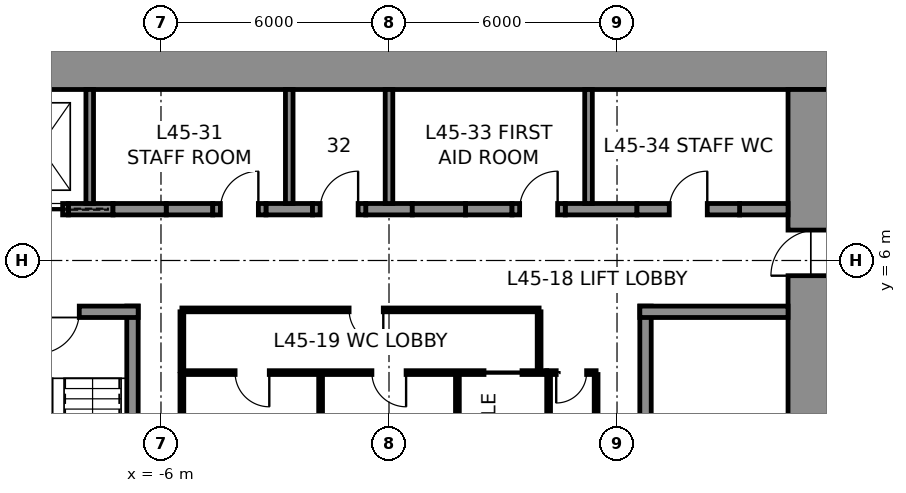
"""IFC4 building model, lengths in metres.
Left out: names, types, materials, properties, quantities, classifications, styles, units other than length and angle.
Written with IfcOpenShell. Run it as: python <this file> out.ifc"""

import sys

from ifc_helpers import new_model, si_unit, direction, frame, frame_2d, origin, place, context, subcontext, project, spatial, rectangle, extrude, element, fill, save


model = new_model("IFC4")
c1 = context("Model", 3, precision=1e-05, world=origin(), true_north=direction((0.0, 1.0)))
c2 = subcontext(c1, "Body", "Model", "MODEL_VIEW")
j1 = project(units=[si_unit("LENGTHUNIT", "METRE"), si_unit("PLANEANGLEUNIT", "RADIAN")], contexts=[c1])
p1 = place(None, origin())
s1 = spatial("IfcSite", under=j1, at=p1, CompositionType="ELEMENT")
p2 = place(p1, origin())
s2 = spatial("IfcBuilding", under=s1, at=p2, CompositionType="ELEMENT")
p3 = place(p2, frame((0.0, 0.0, 209.8)))
s3 = spatial("IfcBuildingStorey", under=s2, at=p3, CompositionType="ELEMENT", Elevation=209.8)
p4 = place(p3, frame((-12.0, 11.25, 0.0), z_axis=(0.0, 0.0, 1.0), x_axis=(1.0, 0.0, 0.0)))
e1 = element("IfcWall", 1, at=p4, inside=s3, PredefinedType="SHEAR", context=c2, shape_type="SweptSolid", body=[
    extrude(rectangle(XDim=24.0, YDim=1.5, at=frame_2d((12.0, 0.0))), origin(), (0.0, 0.0, 1.0), 4.0),
])
p5 = place(p3, frame((11.25, 10.5, 0.0), z_axis=(0.0, 0.0, 1.0), x_axis=(0.0, -1.0, 0.0)))
e2 = element("IfcWall", 2, at=p5, inside=s3, PredefinedType="SHEAR", context=c2, shape_type="SweptSolid", body=[
    extrude(rectangle(XDim=21.0, YDim=1.5, at=frame_2d((10.5, 0.0))), origin(), (0.0, 0.0, 1.0), 4.0),
])
p6 = place(p5, frame((3.7, 0.0, 0.0)))
e3 = element("IfcOpeningElement", 3, at=p6, cuts=e2, PredefinedType="OPENING", context=c2, shape_type="SweptSolid", body=[
    extrude(rectangle(XDim=1.2, YDim=2.3, at=frame_2d((0.6, 1.15))), frame((0.0, 0.76, 0.0), z_axis=(0.0, -1.0, 0.0), x_axis=(1.0, 0.0, 0.0)), (0.0, 0.0, 1.0), 1.52),
])
p7 = place(p5, frame((16.1, 0.0, 0.0)))
e4 = element("IfcOpeningElement", 4, at=p7, cuts=e2, PredefinedType="OPENING", context=c2, shape_type="SweptSolid", body=[
    extrude(rectangle(XDim=1.2, YDim=2.3, at=frame_2d((0.6, 1.15))), frame((0.0, 0.76, 0.0), z_axis=(0.0, -1.0, 0.0), x_axis=(1.0, 0.0, 0.0)), (0.0, 0.0, 1.0), 1.52),
])
p8 = place(p3, frame((-8.438, 7.35, 0.0), z_axis=(0.0, 0.0, 1.0), x_axis=(1.0, 0.0, 0.0)))
e5 = element("IfcWall", 5, at=p8, inside=s3, PredefinedType="SHEAR", context=c2, shape_type="SweptSolid", body=[
    extrude(rectangle(XDim=1.175, YDim=0.3, at=frame_2d((0.587, 0.0))), origin(), (0.0, 0.0, 1.0), 4.0),
])
for number, where, z_axis, x_axis in (
    (6, (-5.863, 7.35, 0.0), (0.0, 0.0, 1.0), (1.0, 0.0, 0.0)),
    (7, (-3.238, 7.35, 0.0), (0.0, 0.0, 1.0), (1.0, 0.0, 0.0)),
    (8, (-0.613, 7.35, 0.0), (0.0, 0.0, 1.0), (1.0, 0.0, 0.0)),
    (9, (2.012, 7.35, 0.0), (0.0, 0.0, 1.0), (1.0, 0.0, 0.0)),
):
    element("IfcWall", number, at=place(p3, frame(where, z_axis=z_axis, x_axis=x_axis)), inside=s3, PredefinedType="SHEAR", context=c2, shape_type="SweptSolid", body=[
        extrude(rectangle(XDim=1.225, YDim=0.3, at=frame_2d((0.613, 0.0))), origin(), (0.0, 0.0, 1.0), 4.0),
    ])
p9 = place(p3, frame((4.637, 7.35, 0.0), z_axis=(0.0, 0.0, 1.0), x_axis=(1.0, 0.0, 0.0)))
e10 = element("IfcWall", 10, at=p9, inside=s3, PredefinedType="SHEAR", context=c2, shape_type="SweptSolid", body=[
    extrude(rectangle(XDim=1.887, YDim=0.3, at=frame_2d((0.944, 0.0))), origin(), (0.0, 0.0, 1.0), 4.0),
])
p10 = place(p3, frame((9.225, 7.35, 0.0), z_axis=(0.0, 0.0, 1.0), x_axis=(1.0, 0.0, 0.0)))
e11 = element("IfcWall", 11, at=p10, inside=s3, PredefinedType="SHEAR", context=c2, shape_type="SweptSolid", body=[
    extrude(rectangle(XDim=1.275, YDim=0.3, at=frame_2d((0.637, 0.0))), origin(), (0.0, 0.0, 1.0), 4.0),
])
p11 = place(p3, frame((-9.938, 7.35, 0.0), z_axis=(0.0, 0.0, 1.0), x_axis=(1.0, 0.0, 0.0)))
e12 = element("IfcWall", 12, at=p11, inside=s3, PredefinedType="PARTITIONING", context=c2, shape_type="SweptSolid", body=[
    extrude(rectangle(XDim=1.5, YDim=0.3, at=frame_2d((0.75, 0.0))), origin(), (0.0, 0.0, 1.0), 4.0),
])
p12 = place(p11, frame((0.15, 0.0, 0.0)))
e13 = element("IfcOpeningElement", 13, at=p12, cuts=e12, PredefinedType="OPENING", context=c2, shape_type="SweptSolid", body=[
    extrude(rectangle(XDim=1.2, YDim=2.3, at=frame_2d((0.6, 1.15))), frame((0.0, 0.16, 0.0), z_axis=(0.0, -1.0, 0.0), x_axis=(1.0, 0.0, 0.0)), (0.0, 0.0, 1.0), 0.32),
])
p13 = place(p3, frame((-7.262, 7.35, 0.0), z_axis=(0.0, 0.0, 1.0), x_axis=(1.0, 0.0, 0.0)))
e14 = element("IfcWall", 14, at=p13, inside=s3, PredefinedType="PARTITIONING", context=c2, shape_type="SweptSolid", body=[
    extrude(rectangle(XDim=1.4, YDim=0.3, at=frame_2d((0.7, 0.0))), origin(), (0.0, 0.0, 1.0), 4.0),
])
p14 = place(p3, frame((-4.637, 7.35, 0.0), z_axis=(0.0, 0.0, 1.0), x_axis=(1.0, 0.0, 0.0)))
e15 = element("IfcWall", 15, at=p14, inside=s3, PredefinedType="PARTITIONING", context=c2, shape_type="SweptSolid", body=[
    extrude(rectangle(XDim=1.4, YDim=0.3, at=frame_2d((0.7, 0.0))), origin(), (0.0, 0.0, 1.0), 4.0),
])
p15 = place(p14, frame((0.2, 0.0, 0.0)))
e16 = element("IfcOpeningElement", 16, at=p15, cuts=e15, PredefinedType="OPENING", context=c2, shape_type="SweptSolid", body=[
    extrude(rectangle(XDim=1.0, YDim=2.3, at=frame_2d((0.5, 1.15))), frame((0.0, 0.16, 0.0), z_axis=(0.0, -1.0, 0.0), x_axis=(1.0, 0.0, 0.0)), (0.0, 0.0, 1.0), 0.32),
])
p16 = place(p3, frame((-2.012, 7.35, 0.0), z_axis=(0.0, 0.0, 1.0), x_axis=(1.0, 0.0, 0.0)))
e17 = element("IfcWall", 17, at=p16, inside=s3, PredefinedType="PARTITIONING", context=c2, shape_type="SweptSolid", body=[
    extrude(rectangle(XDim=1.4, YDim=0.3, at=frame_2d((0.7, 0.0))), origin(), (0.0, 0.0, 1.0), 4.0),
])
p17 = place(p16, frame((0.2, 0.0, 0.0)))
e18 = element("IfcOpeningElement", 18, at=p17, cuts=e17, PredefinedType="OPENING", context=c2, shape_type="SweptSolid", body=[
    extrude(rectangle(XDim=1.0, YDim=2.3, at=frame_2d((0.5, 1.15))), frame((0.0, 0.16, 0.0), z_axis=(0.0, -1.0, 0.0), x_axis=(1.0, 0.0, 0.0)), (0.0, 0.0, 1.0), 0.32),
])
p18 = place(p3, frame((0.613, 7.35, 0.0), z_axis=(0.0, 0.0, 1.0), x_axis=(1.0, 0.0, 0.0)))
e19 = element("IfcWall", 19, at=p18, inside=s3, PredefinedType="PARTITIONING", context=c2, shape_type="SweptSolid", body=[
    extrude(rectangle(XDim=1.4, YDim=0.3, at=frame_2d((0.7, 0.0))), origin(), (0.0, 0.0, 1.0), 4.0),
])
p19 = place(p3, frame((3.238, 7.35, 0.0), z_axis=(0.0, 0.0, 1.0), x_axis=(1.0, 0.0, 0.0)))
e20 = element("IfcWall", 20, at=p19, inside=s3, PredefinedType="PARTITIONING", context=c2, shape_type="SweptSolid", body=[
    extrude(rectangle(XDim=1.4, YDim=0.3, at=frame_2d((0.7, 0.0))), origin(), (0.0, 0.0, 1.0), 4.0),
])
p20 = place(p19, frame((0.2, 0.0, 0.0)))
e21 = element("IfcOpeningElement", 21, at=p20, cuts=e20, PredefinedType="OPENING", context=c2, shape_type="SweptSolid", body=[
    extrude(rectangle(XDim=1.0, YDim=2.3, at=frame_2d((0.5, 1.15))), frame((0.0, 0.16, 0.0), z_axis=(0.0, -1.0, 0.0), x_axis=(1.0, 0.0, 0.0)), (0.0, 0.0, 1.0), 0.32),
])
p21 = place(p3, frame((6.525, 7.35, 0.0), z_axis=(0.0, 0.0, 1.0), x_axis=(1.0, 0.0, 0.0)))
e22 = element("IfcWall", 22, at=p21, inside=s3, PredefinedType="PARTITIONING", context=c2, shape_type="SweptSolid", body=[
    extrude(rectangle(XDim=2.7, YDim=0.3, at=frame_2d((1.35, 0.0))), origin(), (0.0, 0.0, 1.0), 4.0),
])
p22 = place(p21, frame((0.85, 0.0, 0.0)))
e23 = element("IfcOpeningElement", 23, at=p22, cuts=e22, PredefinedType="OPENING", context=c2, shape_type="SweptSolid", body=[
    extrude(rectangle(XDim=1.0, YDim=2.3, at=frame_2d((0.5, 1.15))), frame((0.0, 0.16, 0.0), z_axis=(0.0, -1.0, 0.0), x_axis=(1.0, 0.0, 0.0)), (0.0, 0.0, 1.0), 0.32),
])
for number, where, z_axis, x_axis in (
    (24, (-7.875, 7.5, 0.0), (0.0, 0.0, 1.0), (0.0, 1.0, 0.0)),
    (25, (-2.625, 7.5, 0.0), (0.0, 0.0, 1.0), (0.0, 1.0, 0.0)),
    (26, (0.0, 7.5, 0.0), (0.0, 0.0, 1.0), (0.0, 1.0, 0.0)),
    (27, (5.25, 7.5, 0.0), (0.0, 0.0, 1.0), (0.0, 1.0, 0.0)),
):
    element("IfcWall", number, at=place(p3, frame(where, z_axis=z_axis, x_axis=x_axis)), inside=s3, PredefinedType="PARTITIONING", context=c2, shape_type="SweptSolid", body=[
        extrude(rectangle(XDim=3.0, YDim=0.2, at=frame_2d((1.5, 0.0))), origin(), (0.0, 0.0, 1.0), 4.0),
    ])
p23 = place(p3, frame((-6.75, -4.8, 0.0), z_axis=(0.0, 0.0, 1.0), x_axis=(0.0, 1.0, 0.0)))
e28 = element("IfcWall", 28, at=p23, inside=s3, PredefinedType="SOLIDWALL", context=c2, shape_type="SweptSolid", body=[
    extrude(rectangle(XDim=9.6, YDim=0.3, at=frame_2d((4.8, 0.0))), origin(), (0.0, 0.0, 1.0), 3.75),
])
p24 = place(p3, frame((-10.5, 4.65, 0.0), z_axis=(0.0, 0.0, 1.0), x_axis=(1.0, 0.0, 0.0)))
e29 = element("IfcWall", 29, at=p24, inside=s3, PredefinedType="SOLIDWALL", context=c2, shape_type="SweptSolid", body=[
    extrude(rectangle(XDim=3.9, YDim=0.3, at=frame_2d((1.95, 0.0))), origin(), (0.0, 0.0, 1.0), 3.75),
])
p25 = place(p24, frame((1.25, 0.0, 0.0)))
e30 = element("IfcOpeningElement", 30, at=p25, cuts=e29, PredefinedType="OPENING", context=c2, shape_type="SweptSolid", body=[
    extrude(rectangle(XDim=1.1, YDim=2.3, at=frame_2d((0.55, 1.15))), frame((0.0, 0.16, 0.0), z_axis=(0.0, -1.0, 0.0), x_axis=(1.0, 0.0, 0.0)), (0.0, 0.0, 1.0), 0.32),
])
p26 = place(p3, frame((6.75, -4.8, 0.0), z_axis=(0.0, 0.0, 1.0), x_axis=(0.0, 1.0, 0.0)))
e31 = element("IfcWall", 31, at=p26, inside=s3, PredefinedType="SOLIDWALL", context=c2, shape_type="SweptSolid", body=[
    extrude(rectangle(XDim=9.6, YDim=0.3, at=frame_2d((4.8, 0.0))), origin(), (0.0, 0.0, 1.0), 3.75),
])
p27 = place(p3, frame((6.6, 4.65, 0.0), z_axis=(0.0, 0.0, 1.0), x_axis=(1.0, 0.0, 0.0)))
e32 = element("IfcWall", 32, at=p27, inside=s3, PredefinedType="SOLIDWALL", context=c2, shape_type="SweptSolid", body=[
    extrude(rectangle(XDim=3.9, YDim=0.3, at=frame_2d((1.95, 0.0))), origin(), (0.0, 0.0, 1.0), 3.75),
])
p28 = place(p3, frame((-5.45, 3.05, 0.0), z_axis=(0.0, 0.0, 1.0), x_axis=(1.0, 0.0, 0.0)))
e33 = element("IfcWall", 33, at=p28, inside=s3, PredefinedType="PARTITIONING", context=c2, shape_type="SweptSolid", body=[
    extrude(rectangle(XDim=9.6, YDim=0.1, at=frame_2d((4.8, 0.0))), origin(), (0.0, 0.0, 1.0), 3.75),
])
p29 = place(p28, frame((1.4, 0.0, 0.0)))
e34 = element("IfcOpeningElement", 34, at=p29, cuts=e33, PredefinedType="OPENING", context=c2, shape_type="SweptSolid", body=[
    extrude(rectangle(XDim=0.9, YDim=2.3, at=frame_2d((0.45, 1.15))), frame((0.0, 0.06, 0.0), z_axis=(0.0, -1.0, 0.0), x_axis=(1.0, 0.0, 0.0)), (0.0, 0.0, 1.0), 0.12),
])
p30 = place(p28, frame((5.0, 0.0, 0.0)))
e35 = element("IfcOpeningElement", 35, at=p30, cuts=e33, PredefinedType="OPENING", context=c2, shape_type="SweptSolid", body=[
    extrude(rectangle(XDim=0.9, YDim=2.3, at=frame_2d((0.45, 1.15))), frame((0.0, 0.06, 0.0), z_axis=(0.0, -1.0, 0.0), x_axis=(1.0, 0.0, 0.0)), (0.0, 0.0, 1.0), 0.12),
])
p31 = place(p28, frame((7.95, 0.0, 0.0)))
e36 = element("IfcOpeningElement", 36, at=p31, cuts=e33, PredefinedType="OPENING", context=c2, shape_type="SweptSolid", body=[
    extrude(rectangle(XDim=1.0, YDim=2.3, at=frame_2d((0.5, 1.15))), frame((0.0, 0.06, 0.0), z_axis=(0.0, -1.0, 0.0), x_axis=(1.0, 0.0, 0.0)), (0.0, 0.0, 1.0), 0.12),
])
p32 = place(p3, frame((4.15, 3.05, 0.0), z_axis=(0.0, 0.0, 1.0), x_axis=(1.0, 0.0, 0.0)))
e37 = element("IfcWall", 37, at=p32, inside=s3, PredefinedType="PARTITIONING", context=c2, shape_type="SweptSolid", body=[
    extrude(rectangle(XDim=1.3, YDim=0.1, at=frame_2d((0.65, 0.0))), origin(), (0.0, 0.0, 1.0), 3.75),
])
p33 = place(p32, frame((0.25, 0.0, 0.0)))
e38 = element("IfcOpeningElement", 38, at=p33, cuts=e37, PredefinedType="OPENING", context=c2, shape_type="SweptSolid", body=[
    extrude(rectangle(XDim=0.8, YDim=2.3, at=frame_2d((0.4, 1.15))), frame((0.0, 0.06, 0.0), z_axis=(0.0, -1.0, 0.0), x_axis=(1.0, 0.0, 0.0)), (0.0, 0.0, 1.0), 0.12),
])
for number, where, z_axis, x_axis in (
    (39, (5.45, 3.0, 0.0), (0.0, 0.0, 1.0), (0.0, -1.0, 0.0)),
    (40, (-5.45, -3.0, 0.0), (0.0, 0.0, 1.0), (0.0, 1.0, 0.0)),
    (41, (-1.8, -3.0, 0.0), (0.0, 0.0, 1.0), (0.0, 1.0, 0.0)),
    (42, (1.8, -3.0, 0.0), (0.0, 0.0, 1.0), (0.0, 1.0, 0.0)),
    (43, (4.2, -3.0, 0.0), (0.0, 0.0, 1.0), (0.0, 1.0, 0.0)),
):
    element("IfcWall", number, at=place(p3, frame(where, z_axis=z_axis, x_axis=x_axis)), inside=s3, PredefinedType="PARTITIONING", context=c2, shape_type="SweptSolid", body=[
        extrude(rectangle(XDim=6.0, YDim=0.1, at=frame_2d((3.0, 0.0))), origin(), (0.0, 0.0, 1.0), 3.75),
    ])
p34 = place(p3, frame((-5.45, 4.7, 0.0), z_axis=(0.0, 0.0, 1.0), x_axis=(1.0, 0.0, 0.0)))
e44 = element("IfcWall", 44, at=p34, inside=s3, PredefinedType="PARTITIONING", context=c2, shape_type="SweptSolid", body=[
    extrude(rectangle(XDim=9.4, YDim=0.1, at=frame_2d((4.7, 0.0))), origin(), (0.0, 0.0, 1.0), 3.75),
])
p35 = place(p34, frame((4.4, 0.0, 0.0)))
e45 = element("IfcOpeningElement", 45, at=p35, cuts=e44, PredefinedType="OPENING", context=c2, shape_type="SweptSolid", body=[
    extrude(rectangle(XDim=0.9, YDim=2.3, at=frame_2d((0.45, 1.15))), frame((0.0, 0.06, 0.0), z_axis=(0.0, -1.0, 0.0), x_axis=(1.0, 0.0, 0.0)), (0.0, 0.0, 1.0), 0.12),
])
for number, where, z_axis, x_axis in (
    (46, (-5.45, 3.1, 0.0), (0.0, 0.0, 1.0), (0.0, 1.0, 0.0)),
    (47, (3.95, 3.1, 0.0), (0.0, 0.0, 1.0), (0.0, 1.0, 0.0)),
):
    element("IfcWall", number, at=place(p3, frame(where, z_axis=z_axis, x_axis=x_axis)), inside=s3, PredefinedType="PARTITIONING", context=c2, shape_type="SweptSolid", body=[
        extrude(rectangle(XDim=1.55, YDim=0.1, at=frame_2d((0.775, 0.0))), origin(), (0.0, 0.0, 1.0), 3.75),
    ])
p36 = place(p25, frame((1.1, 0.0, 0.0), z_axis=(0.0, 0.0, 1.0), x_axis=(-1.0, 0.0, 0.0)))
e48 = element("IfcDoor", 48, at=p36, inside=s3, OperationType="SINGLE_SWING_RIGHT", PredefinedType="DOOR", context=c2, shape_type="SweptSolid", body=[
    extrude(rectangle(XDim=1.1, YDim=2.3, at=frame_2d((0.55, 1.15))), frame((0.0, 0.025, 0.0), z_axis=(0.0, -1.0, 0.0), x_axis=(1.0, 0.0, 0.0)), (0.0, 0.0, 1.0), 0.05),
])
fill(e30, e48)
p37 = place(p29, frame((0.9, 0.0, 0.0), z_axis=(0.0, 0.0, 1.0), x_axis=(-1.0, 0.0, 0.0)))
e49 = element("IfcDoor", 49, at=p37, inside=s3, OperationType="SINGLE_SWING_LEFT", PredefinedType="DOOR", context=c2, shape_type="SweptSolid", body=[
    extrude(rectangle(XDim=0.9, YDim=2.3, at=frame_2d((0.45, 1.15))), frame((0.0, 0.025, 0.0), z_axis=(0.0, -1.0, 0.0), x_axis=(1.0, 0.0, 0.0)), (0.0, 0.0, 1.0), 0.05),
])
fill(e34, e49)
p38 = place(p30, frame((0.9, 0.0, 0.0), z_axis=(0.0, 0.0, 1.0), x_axis=(-1.0, 0.0, 0.0)))
e50 = element("IfcDoor", 50, at=p38, inside=s3, OperationType="SINGLE_SWING_LEFT", PredefinedType="DOOR", context=c2, shape_type="SweptSolid", body=[
    extrude(rectangle(XDim=0.9, YDim=2.3, at=frame_2d((0.45, 1.15))), frame((0.0, 0.025, 0.0), z_axis=(0.0, -1.0, 0.0), x_axis=(1.0, 0.0, 0.0)), (0.0, 0.0, 1.0), 0.05),
])
fill(e35, e50)
p39 = place(p31, frame((1.0, 0.0, 0.0), z_axis=(0.0, 0.0, 1.0), x_axis=(-1.0, 0.0, 0.0)))
e51 = element("IfcDoor", 51, at=p39, inside=s3, OperationType="SLIDING_TO_LEFT", PredefinedType="DOOR", context=c2, shape_type="SweptSolid", body=[
    extrude(rectangle(XDim=1.0, YDim=2.3, at=frame_2d((0.5, 1.15))), frame((0.0, 0.025, 0.0), z_axis=(0.0, -1.0, 0.0), x_axis=(1.0, 0.0, 0.0)), (0.0, 0.0, 1.0), 0.05),
])
fill(e36, e51)
p40 = place(p33, frame((0.8, 0.0, 0.0), z_axis=(0.0, 0.0, 1.0), x_axis=(-1.0, 0.0, 0.0)))
e52 = element("IfcDoor", 52, at=p40, inside=s3, OperationType="SINGLE_SWING_RIGHT", PredefinedType="DOOR", context=c2, shape_type="SweptSolid", body=[
    extrude(rectangle(XDim=0.8, YDim=2.3, at=frame_2d((0.4, 1.15))), frame((0.0, 0.025, 0.0), z_axis=(0.0, -1.0, 0.0), x_axis=(1.0, 0.0, 0.0)), (0.0, 0.0, 1.0), 0.05),
])
fill(e38, e52)
p41 = place(p35, frame((0.9, 0.0, 0.0), z_axis=(0.0, 0.0, 1.0), x_axis=(-1.0, 0.0, 0.0)))
e53 = element("IfcDoor", 53, at=p41, inside=s3, OperationType="SINGLE_SWING_LEFT", PredefinedType="DOOR", context=c2, shape_type="SweptSolid", body=[
    extrude(rectangle(XDim=0.9, YDim=2.3, at=frame_2d((0.45, 1.15))), frame((0.0, 0.025, 0.0), z_axis=(0.0, -1.0, 0.0), x_axis=(1.0, 0.0, 0.0)), (0.0, 0.0, 1.0), 0.05),
])
fill(e45, e53)
p42 = place(p15, origin())
e54 = element("IfcDoor", 54, at=p42, inside=s3, OperationType="SINGLE_SWING_RIGHT", PredefinedType="DOOR", context=c2, shape_type="SweptSolid", body=[
    extrude(rectangle(XDim=1.0, YDim=2.3, at=frame_2d((0.5, 1.15))), frame((0.0, 0.025, 0.0), z_axis=(0.0, -1.0, 0.0), x_axis=(1.0, 0.0, 0.0)), (0.0, 0.0, 1.0), 0.05),
])
fill(e16, e54)
p43 = place(p17, origin())
e55 = element("IfcDoor", 55, at=p43, inside=s3, OperationType="SINGLE_SWING_RIGHT", PredefinedType="DOOR", context=c2, shape_type="SweptSolid", body=[
    extrude(rectangle(XDim=1.0, YDim=2.3, at=frame_2d((0.5, 1.15))), frame((0.0, 0.025, 0.0), z_axis=(0.0, -1.0, 0.0), x_axis=(1.0, 0.0, 0.0)), (0.0, 0.0, 1.0), 0.05),
])
fill(e18, e55)
p44 = place(p20, origin())
e56 = element("IfcDoor", 56, at=p44, inside=s3, OperationType="SINGLE_SWING_RIGHT", PredefinedType="DOOR", context=c2, shape_type="SweptSolid", body=[
    extrude(rectangle(XDim=1.0, YDim=2.3, at=frame_2d((0.5, 1.15))), frame((0.0, 0.025, 0.0), z_axis=(0.0, -1.0, 0.0), x_axis=(1.0, 0.0, 0.0)), (0.0, 0.0, 1.0), 0.05),
])
fill(e21, e56)
p45 = place(p22, origin())
e57 = element("IfcDoor", 57, at=p45, inside=s3, OperationType="SINGLE_SWING_RIGHT", PredefinedType="DOOR", context=c2, shape_type="SweptSolid", body=[
    extrude(rectangle(XDim=1.0, YDim=2.3, at=frame_2d((0.5, 1.15))), frame((0.0, 0.025, 0.0), z_axis=(0.0, -1.0, 0.0), x_axis=(1.0, 0.0, 0.0)), (0.0, 0.0, 1.0), 0.05),
])
fill(e23, e57)
p46 = place(p6, frame((1.2, 0.0, 0.0), z_axis=(0.0, 0.0, 1.0), x_axis=(-1.0, 0.0, 0.0)))
e58 = element("IfcDoor", 58, at=p46, inside=s3, OperationType="SINGLE_SWING_LEFT", PredefinedType="DOOR", context=c2, shape_type="SweptSolid", body=[
    extrude(rectangle(XDim=1.2, YDim=2.3, at=frame_2d((0.6, 1.15))), frame((0.0, 0.025, 0.0), z_axis=(0.0, -1.0, 0.0), x_axis=(1.0, 0.0, 0.0)), (0.0, 0.0, 1.0), 0.05),
])
fill(e3, e58)
p47 = place(p12, frame((1.2, 0.0, 0.0), z_axis=(0.0, 0.0, 1.0), x_axis=(-1.0, 0.0, 0.0)))
e59 = element("IfcDoor", 59, at=p47, inside=s3, OperationType="SLIDING_TO_LEFT", PredefinedType="DOOR", context=c2, shape_type="SweptSolid", body=[
    extrude(rectangle(XDim=1.2, YDim=2.3, at=frame_2d((0.6, 1.15))), frame((0.0, 0.025, 0.0), z_axis=(0.0, -1.0, 0.0), x_axis=(1.0, 0.0, 0.0)), (0.0, 0.0, 1.0), 0.05),
])
fill(e13, e59)
save(model, sys.argv[1])
